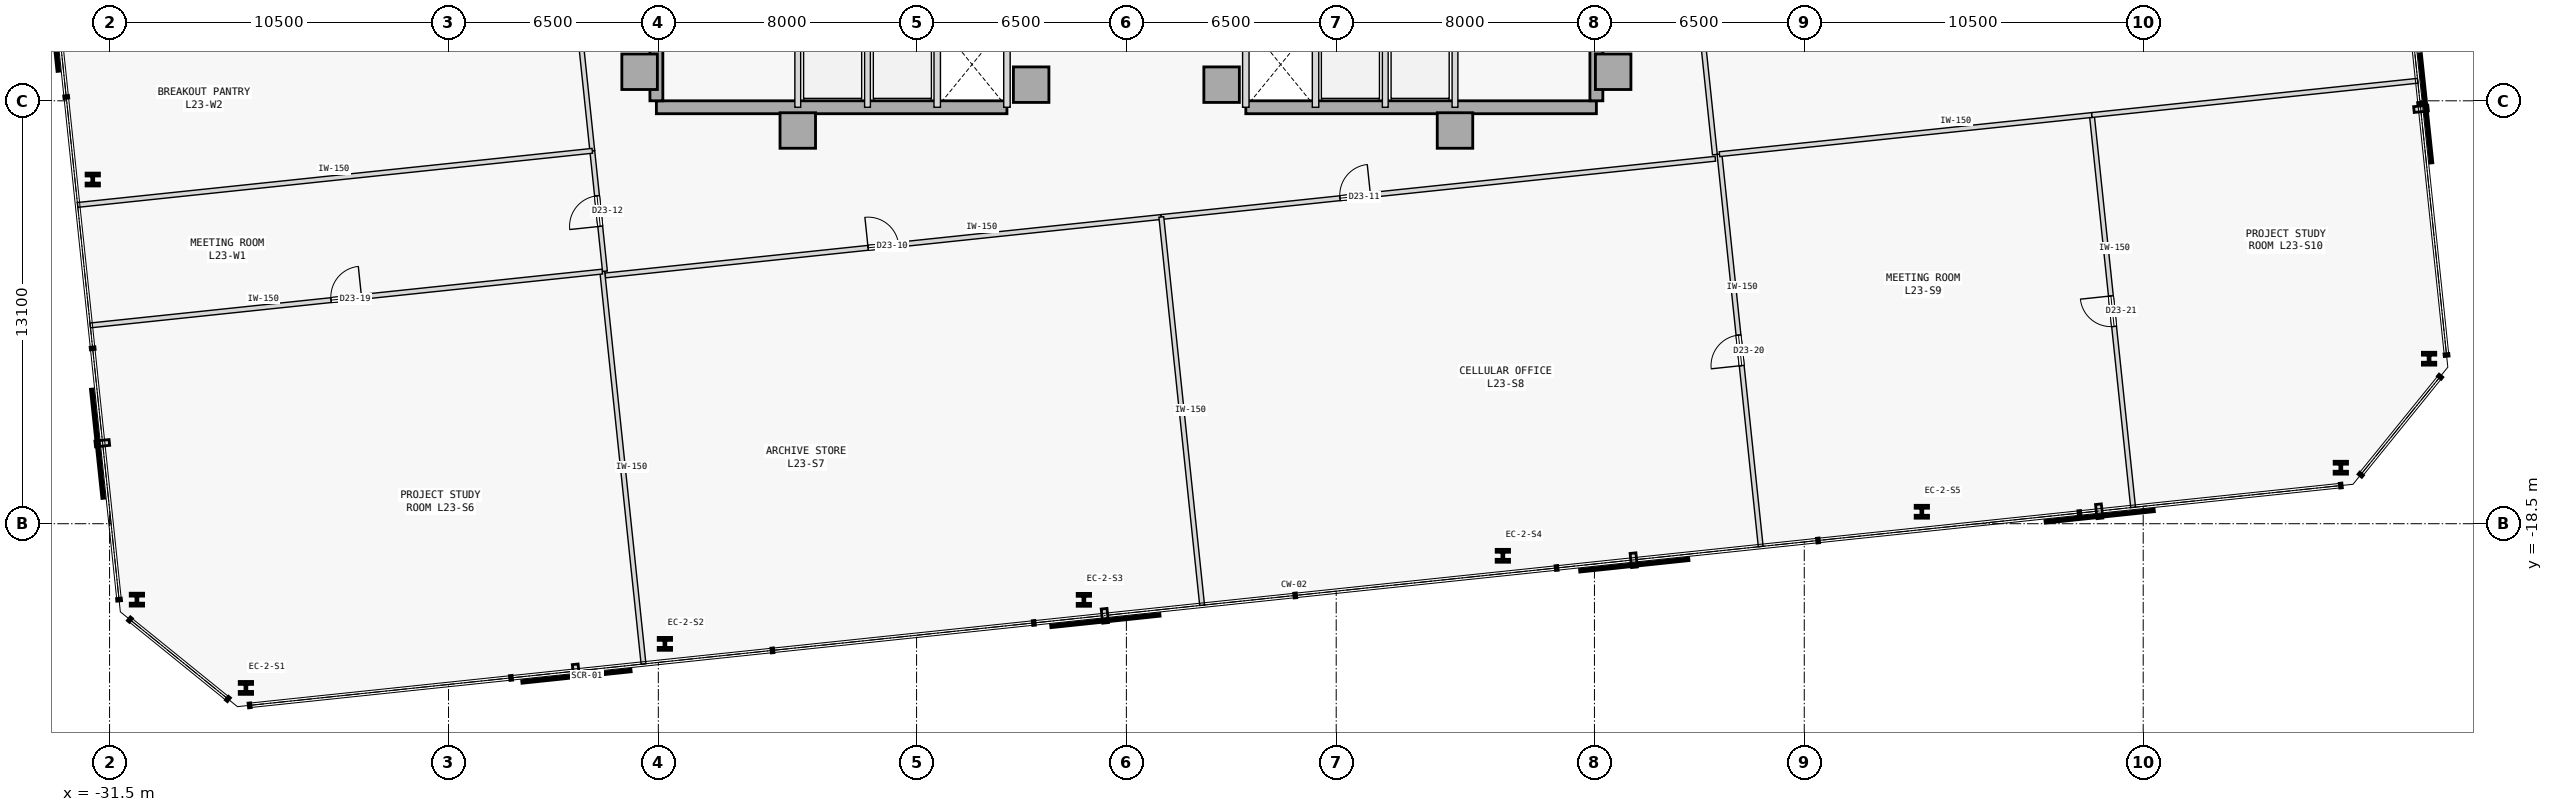
"""IFC4 building model, lengths in metres.
Left out: names, types, materials, properties, quantities, classifications, styles, units other than length and angle.
Written with IfcOpenShell. Run it as: python <this file> out.ifc"""

import sys

from ifc_helpers import new_model, si_unit, direction, frame, frame_2d, origin, origin_2d, place, context, subcontext, project, spatial, rectangle, i_section, extrude, element, fill, save


model = new_model("IFC4")
c1 = context("Model", 3, precision=1e-05, world=origin(), true_north=direction((0.0, 1.0)))
c2 = subcontext(c1, "Body", "Model", "MODEL_VIEW")
j1 = project(units=[si_unit("LENGTHUNIT", "METRE"), si_unit("PLANEANGLEUNIT", "RADIAN")], contexts=[c1])
p1 = place(None, origin())
s1 = spatial("IfcSite", under=j1, at=p1, CompositionType="ELEMENT")
p2 = place(p1, origin())
s2 = spatial("IfcBuilding", under=s1, at=p2, CompositionType="ELEMENT")
p3 = place(p2, frame((0.0, 0.0, 94.8)))
s3 = spatial("IfcBuildingStorey", under=s2, at=p3, CompositionType="ELEMENT", Elevation=94.8)
for number, where, z_axis, x_axis in (
    (1, (-15.08, -4.5, 0.0), (0.0, 0.0, 1.0), (1.0, 0.0, 0.0)),
    (2, (-10.18, -6.32, 0.0), (0.0, 0.0, 1.0), (1.0, 0.0, 0.0)),
    (3, (-2.95, -4.9, 0.0), (0.0, 0.0, 1.0), (1.0, 0.0, 0.0)),
    (4, (15.08, -4.5, 0.0), (0.0, 0.0, 1.0), (1.0, 0.0, 0.0)),
    (5, (10.18, -6.32, 0.0), (0.0, 0.0, 1.0), (1.0, 0.0, 0.0)),
    (6, (2.95, -4.9, 0.0), (0.0, 0.0, 1.0), (1.0, 0.0, 0.0)),
):
    element("IfcColumn", number, at=place(p3, frame(where, z_axis=z_axis, x_axis=x_axis)), inside=s3, PredefinedType="COLUMN", context=c2, shape_type="SweptSolid", body=[
        extrude(rectangle(XDim=1.1, YDim=1.1, at=origin_2d()), origin(), (0.0, 0.0, 1.0), 3.7),
    ])
p4 = place(p3, frame((-14.56, -5.6, 0.0), z_axis=(0.0, 0.0, 1.0), x_axis=(1.0, 0.0, 0.0)))
e7 = element("IfcWall", 7, at=p4, inside=s3, PredefinedType="SHEAR", context=c2, shape_type="SweptSolid", body=[
    extrude(rectangle(XDim=10.86, YDim=0.4, at=frame_2d((5.43, 0.0))), origin(), (0.0, 0.0, 1.0), 3.475),
])
p5 = place(p3, frame((-14.56, -5.4, 0.0), z_axis=(0.0, 0.0, 1.0), x_axis=(0.0, 1.0, 0.0)))
e8 = element("IfcWall", 8, at=p5, inside=s3, PredefinedType="SHEAR", context=c2, shape_type="SweptSolid", body=[
    extrude(rectangle(XDim=10.8, YDim=0.4, at=frame_2d((5.4, 0.0))), origin(), (0.0, 0.0, 1.0), 3.475),
])
p6 = place(p3, frame((3.7, -5.6, 0.0), z_axis=(0.0, 0.0, 1.0), x_axis=(1.0, 0.0, 0.0)))
e9 = element("IfcWall", 9, at=p6, inside=s3, PredefinedType="SHEAR", context=c2, shape_type="SweptSolid", body=[
    extrude(rectangle(XDim=10.86, YDim=0.4, at=frame_2d((5.43, 0.0))), origin(), (0.0, 0.0, 1.0), 3.475),
])
p7 = place(p3, frame((14.56, -5.4, 0.0), z_axis=(0.0, 0.0, 1.0), x_axis=(0.0, 1.0, 0.0)))
e10 = element("IfcWall", 10, at=p7, inside=s3, PredefinedType="SHEAR", context=c2, shape_type="SweptSolid", body=[
    extrude(rectangle(XDim=10.8, YDim=0.4, at=frame_2d((5.4, 0.0))), origin(), (0.0, 0.0, 1.0), 3.475),
])
for number, where, z_axis, x_axis in (
    (11, (-27.276, -23.586, 0.0), (0.0, 0.0, 1.0), (1.0, 0.0, 0.0)),
    (12, (-14.297, -22.222, 0.0), (0.0, 0.0, 1.0), (1.0, 0.0, 0.0)),
    (13, (-1.317, -20.858, 0.0), (0.0, 0.0, 1.0), (1.0, 0.0, 0.0)),
    (14, (11.663, -19.494, 0.0), (0.0, 0.0, 1.0), (1.0, 0.0, 0.0)),
    (15, (24.642, -18.129, 0.0), (0.0, 0.0, 1.0), (1.0, 0.0, 0.0)),
    (16, (37.622, -16.765, 0.0), (0.0, 0.0, 1.0), (1.0, 0.0, 0.0)),
    (17, (40.356, -13.389, 0.0), (0.0, 0.0, 1.0), (1.0, 0.0, 0.0)),
    (18, (-32.021, -7.838, 0.0), (0.0, 0.0, 1.0), (1.0, 0.0, 0.0)),
    (19, (-30.653, -20.852, 0.0), (0.0, 0.0, 1.0), (1.0, 0.0, 0.0)),
):
    element("IfcColumn", number, at=place(p3, frame(where, z_axis=z_axis, x_axis=x_axis)), inside=s3, PredefinedType="COLUMN", context=c2, shape_type="SweptSolid", body=[
        extrude(i_section(OverallWidth=0.413, OverallDepth=0.398, WebThickness=0.056, FlangeThickness=0.089, FilletRadius=0.015, at=origin_2d()), origin(), (0.0, 0.0, 1.0), 3.7),
    ])
for number, where, z_axis, x_axis in (
    (20, (-3.7, -5.6, 0.0), (0.0, 0.0, 1.0), (0.0, 1.0, 0.0)),
    (21, (-5.86, -5.6, 0.0), (0.0, 0.0, 1.0), (0.0, 1.0, 0.0)),
):
    element("IfcWall", number, at=place(p3, frame(where, z_axis=z_axis, x_axis=x_axis)), inside=s3, PredefinedType="STANDARD", context=c2, shape_type="SweptSolid", body=[
        extrude(rectangle(XDim=2.65, YDim=0.2, at=frame_2d((1.325, 0.0))), origin(), (0.0, 0.0, 1.0), 3.475),
    ])
for number, where, z_axis, x_axis in (
    (22, (-10.18, -5.6, 0.0), (0.0, 0.0, 1.0), (0.0, 1.0, 0.0)),
    (23, (-8.02, -5.6, 0.0), (0.0, 0.0, 1.0), (0.0, 1.0, 0.0)),
):
    element("IfcWall", number, at=place(p3, frame(where, z_axis=z_axis, x_axis=x_axis)), inside=s3, PredefinedType="STANDARD", context=c2, shape_type="SweptSolid", body=[
        extrude(rectangle(XDim=2.65, YDim=0.18, at=frame_2d((1.325, 0.0))), origin(), (0.0, 0.0, 1.0), 3.475),
    ])
for number, where, z_axis, x_axis in (
    (24, (3.7, -5.6, 0.0), (0.0, 0.0, 1.0), (0.0, 1.0, 0.0)),
    (25, (5.86, -5.6, 0.0), (0.0, 0.0, 1.0), (0.0, 1.0, 0.0)),
):
    element("IfcWall", number, at=place(p3, frame(where, z_axis=z_axis, x_axis=x_axis)), inside=s3, PredefinedType="STANDARD", context=c2, shape_type="SweptSolid", body=[
        extrude(rectangle(XDim=2.65, YDim=0.2, at=frame_2d((1.325, 0.0))), origin(), (0.0, 0.0, 1.0), 3.475),
    ])
for number, where, z_axis, x_axis in (
    (26, (10.18, -5.6, 0.0), (0.0, 0.0, 1.0), (0.0, 1.0, 0.0)),
    (27, (8.02, -5.6, 0.0), (0.0, 0.0, 1.0), (0.0, 1.0, 0.0)),
):
    element("IfcWall", number, at=place(p3, frame(where, z_axis=z_axis, x_axis=x_axis)), inside=s3, PredefinedType="STANDARD", context=c2, shape_type="SweptSolid", body=[
        extrude(rectangle(XDim=2.65, YDim=0.18, at=frame_2d((1.325, 0.0))), origin(), (0.0, 0.0, 1.0), 3.475),
    ])
p8 = place(p3, frame((-16.14, -10.809, 0.0), z_axis=(0.0, 0.0, 1.0), x_axis=(0.994522126729, 0.104526261998, 0.0)))
e28 = element("IfcWall", 28, at=p8, inside=s3, PredefinedType="PARTITIONING", context=c2, shape_type="SweptSolid", body=[
    extrude(rectangle(XDim=17.317, YDim=0.15, at=frame_2d((8.658, 0.0))), origin(), (0.0, 0.0, 1.0), 3.475),
])
p9 = place(p8, frame((8.184, 0.0, 0.0)))
e29 = element("IfcOpeningElement", 29, at=p9, cuts=e28, PredefinedType="OPENING", context=c2, shape_type="SweptSolid", body=[
    extrude(rectangle(XDim=0.95, YDim=2.15, at=frame_2d((0.475, 1.075))), frame((0.0, 0.085, 0.0), z_axis=(0.0, -1.0, 0.0), x_axis=(1.0, 0.0, 0.0)), (0.0, 0.0, 1.0), 0.17),
])
p10 = place(p3, frame((1.082, -8.999, 0.0), z_axis=(0.0, 0.0, 1.0), x_axis=(0.994522803526, 0.104519822363, 0.0)))
e30 = element("IfcWall", 30, at=p10, inside=s3, PredefinedType="PARTITIONING", context=c2, shape_type="SweptSolid", body=[
    extrude(rectangle(XDim=17.257, YDim=0.15, at=frame_2d((8.628, 0.0))), origin(), (0.0, 0.0, 1.0), 3.475),
])
p11 = place(p10, frame((5.565, 0.0, 0.0)))
e31 = element("IfcOpeningElement", 31, at=p11, cuts=e30, PredefinedType="OPENING", context=c2, shape_type="SweptSolid", body=[
    extrude(rectangle(XDim=0.95, YDim=2.15, at=frame_2d((0.475, 1.075))), frame((0.0, 0.085, 0.0), z_axis=(0.0, -1.0, 0.0), x_axis=(1.0, 0.0, 0.0)), (0.0, 0.0, 1.0), 0.17),
])
p12 = place(p3, frame((-16.153, -10.682, 0.0), z_axis=(0.0, 0.0, 1.0), x_axis=(-0.104539173002, 0.994520769671, 0.0)))
e32 = element("IfcWall", 32, at=p12, inside=s3, PredefinedType="PARTITIONING", context=c2, shape_type="SweptSolid", body=[
    extrude(rectangle(XDim=3.753, YDim=0.15, at=frame_2d((1.876, 0.0))), origin(), (0.0, 0.0, 1.0), 3.475),
])
p13 = place(p12, frame((1.402, 0.0, 0.0)))
e33 = element("IfcOpeningElement", 33, at=p13, cuts=e32, PredefinedType="OPENING", context=c2, shape_type="SweptSolid", body=[
    extrude(rectangle(XDim=0.95, YDim=2.15, at=frame_2d((0.475, 1.075))), frame((0.0, 0.085, 0.0), z_axis=(0.0, -1.0, 0.0), x_axis=(1.0, 0.0, 0.0)), (0.0, 0.0, 1.0), 0.17),
])
p14 = place(p3, frame((-16.546, -6.949, 0.0), z_axis=(0.0, 0.0, 1.0), x_axis=(-0.104520314957, 0.994522751756, 0.0)))
e34 = element("IfcWall", 34, at=p14, inside=s3, PredefinedType="PARTITIONING", context=c2, shape_type="SweptSolid", body=[
    extrude(rectangle(XDim=5.718, YDim=0.15, at=frame_2d((2.859, 0.0))), origin(), (0.0, 0.0, 1.0), 3.475),
])
p15 = place(p14, frame((3.242, 0.0, 0.0)))
e35 = element("IfcOpeningElement", 35, at=p15, cuts=e34, PredefinedType="OPENING", context=c2, shape_type="SweptSolid", body=[
    extrude(rectangle(XDim=0.95, YDim=2.15, at=frame_2d((0.475, 1.075))), frame((0.0, 0.085, 0.0), z_axis=(0.0, -1.0, 0.0), x_axis=(1.0, 0.0, 0.0)), (0.0, 0.0, 1.0), 0.17),
])
p16 = place(p3, frame((18.231, -7.068, 0.0), z_axis=(0.0, 0.0, 1.0), x_axis=(-0.104536082083, 0.994521094569, 0.0)))
e36 = element("IfcWall", 36, at=p16, inside=s3, PredefinedType="PARTITIONING", context=c2, shape_type="SweptSolid", body=[
    extrude(rectangle(XDim=11.794, YDim=0.15, at=frame_2d((5.897, 0.0))), origin(), (0.0, 0.0, 1.0), 3.475),
])
p17 = place(p16, frame((5.422, 0.0, 0.0)))
e37 = element("IfcOpeningElement", 37, at=p17, cuts=e36, PredefinedType="OPENING", context=c2, shape_type="SweptSolid", body=[
    extrude(rectangle(XDim=0.95, YDim=2.15, at=frame_2d((0.475, 1.075))), frame((0.0, 0.085, 0.0), z_axis=(0.0, -1.0, 0.0), x_axis=(1.0, 0.0, 0.0)), (0.0, 0.0, 1.0), 0.17),
])
p18 = place(p3, frame((-14.958, -22.844, 0.0), z_axis=(0.0, 0.0, 1.0), x_axis=(-0.104540236679, 0.994520657862, 0.0)))
e38 = element("IfcWall", 38, at=p18, inside=s3, PredefinedType="PARTITIONING", context=c2, shape_type="SweptSolid", body=[
    extrude(rectangle(XDim=12.221, YDim=0.15, at=frame_2d((6.11, 0.0))), origin(), (0.0, 0.0, 1.0), 3.475),
])
p19 = place(p3, frame((-32.099, -12.358, 0.0), z_axis=(0.0, 0.0, 1.0), x_axis=(0.994521795881, 0.104529409818, 0.0)))
e39 = element("IfcWall", 39, at=p19, inside=s3, PredefinedType="PARTITIONING", context=c2, shape_type="SweptSolid", body=[
    extrude(rectangle(XDim=15.95, YDim=0.15, at=frame_2d((7.975, 0.0))), origin(), (0.0, 0.0, 1.0), 3.475),
])
p20 = place(p19, frame((7.5, 0.0, 0.0)))
e40 = element("IfcOpeningElement", 40, at=p20, cuts=e39, PredefinedType="OPENING", context=c2, shape_type="SweptSolid", body=[
    extrude(rectangle(XDim=0.95, YDim=2.15, at=frame_2d((0.475, 1.075))), frame((0.0, 0.085, 0.0), z_axis=(0.0, -1.0, 0.0), x_axis=(1.0, 0.0, 0.0)), (0.0, 0.0, 1.0), 0.17),
])
p21 = place(p3, frame((2.346, -21.026, 0.0), z_axis=(0.0, 0.0, 1.0), x_axis=(-0.104535555083, 0.994521149963, 0.0)))
e41 = element("IfcWall", 41, at=p21, inside=s3, PredefinedType="PARTITIONING", context=c2, shape_type="SweptSolid", body=[
    extrude(rectangle(XDim=12.093, YDim=0.15, at=frame_2d((6.046, 0.0))), origin(), (0.0, 0.0, 1.0), 3.475),
])
p22 = place(p3, frame((19.651, -19.207, 0.0), z_axis=(0.0, 0.0, 1.0), x_axis=(-0.104540236679, 0.994520657862, 0.0)))
e42 = element("IfcWall", 42, at=p22, inside=s3, PredefinedType="PARTITIONING", context=c2, shape_type="SweptSolid", body=[
    extrude(rectangle(XDim=12.221, YDim=0.15, at=frame_2d((6.11, 0.0))), origin(), (0.0, 0.0, 1.0), 3.475),
])
p23 = place(p22, frame((5.635, 0.0, 0.0)))
e43 = element("IfcOpeningElement", 43, at=p23, cuts=e42, PredefinedType="OPENING", context=c2, shape_type="SweptSolid", body=[
    extrude(rectangle(XDim=0.95, YDim=2.15, at=frame_2d((0.475, 1.075))), frame((0.0, 0.085, 0.0), z_axis=(0.0, -1.0, 0.0), x_axis=(1.0, 0.0, 0.0)), (0.0, 0.0, 1.0), 0.17),
])
p24 = place(p3, frame((31.187, -17.994, 0.0), z_axis=(0.0, 0.0, 1.0), x_axis=(-0.104520477826, 0.99452273464, 0.0)))
e44 = element("IfcWall", 44, at=p24, inside=s3, PredefinedType="PARTITIONING", context=c2, shape_type="SweptSolid", body=[
    extrude(rectangle(XDim=12.221, YDim=0.15, at=frame_2d((6.11, 0.0))), origin(), (0.0, 0.0, 1.0), 3.475),
])
p25 = place(p24, frame((5.635, 0.0, 0.0)))
e45 = element("IfcOpeningElement", 45, at=p25, cuts=e44, PredefinedType="OPENING", context=c2, shape_type="SweptSolid", body=[
    extrude(rectangle(XDim=0.95, YDim=2.15, at=frame_2d((0.475, 1.075))), frame((0.0, 0.085, 0.0), z_axis=(0.0, -1.0, 0.0), x_axis=(1.0, 0.0, 0.0)), (0.0, 0.0, 1.0), 0.17),
])
p26 = place(p3, frame((18.373, -7.053, 0.0), z_axis=(0.0, 0.0, 1.0), x_axis=(0.994521010406, 0.104536882776, 0.0)))
e46 = element("IfcWall", 46, at=p26, inside=s3, PredefinedType="PARTITIONING", context=c2, shape_type="SweptSolid", body=[
    extrude(rectangle(XDim=11.6, YDim=0.15, at=frame_2d((5.8, 0.0))), origin(), (0.0, 0.0, 1.0), 3.475),
])
p27 = place(p3, frame((29.91, -5.84, 0.0), z_axis=(0.0, 0.0, 1.0), x_axis=(0.994521257273, 0.104534534165, 0.0)))
e47 = element("IfcWall", 47, at=p27, inside=s3, PredefinedType="PARTITIONING", context=c2, shape_type="SweptSolid", body=[
    extrude(rectangle(XDim=10.15, YDim=0.15, at=frame_2d((5.075, 0.0))), origin(), (0.0, 0.0, 1.0), 3.475),
])
p28 = place(p3, frame((-32.491, -8.625, 0.0), z_axis=(0.0, 0.0, 1.0), x_axis=(0.994522794159, 0.104519911488, 0.0)))
e48 = element("IfcWall", 48, at=p28, inside=s3, PredefinedType="PARTITIONING", context=c2, shape_type="SweptSolid", body=[
    extrude(rectangle(XDim=16.033, YDim=0.15, at=frame_2d((8.017, 0.0))), origin(), (0.0, 0.0, 1.0), 3.475),
])
p29 = place(p9, origin())
e49 = element("IfcDoor", 49, at=p29, inside=s3, OperationType="SINGLE_SWING_LEFT", PredefinedType="DOOR", context=c2, shape_type="SweptSolid", body=[
    extrude(rectangle(XDim=0.95, YDim=2.15, at=frame_2d((0.475, 1.075))), frame((0.0, 0.025, 0.0), z_axis=(0.0, -1.0, 0.0), x_axis=(1.0, 0.0, 0.0)), (0.0, 0.0, 1.0), 0.05),
])
fill(e29, e49)
p30 = place(p11, origin())
e50 = element("IfcDoor", 50, at=p30, inside=s3, OperationType="SINGLE_SWING_RIGHT", PredefinedType="DOOR", context=c2, shape_type="SweptSolid", body=[
    extrude(rectangle(XDim=0.95, YDim=2.15, at=frame_2d((0.475, 1.075))), frame((0.0, 0.025, 0.0), z_axis=(0.0, -1.0, 0.0), x_axis=(1.0, 0.0, 0.0)), (0.0, 0.0, 1.0), 0.05),
])
fill(e31, e50)
p31 = place(p13, origin())
e51 = element("IfcDoor", 51, at=p31, inside=s3, OperationType="SINGLE_SWING_LEFT", PredefinedType="DOOR", context=c2, shape_type="SweptSolid", body=[
    extrude(rectangle(XDim=0.95, YDim=2.15, at=frame_2d((0.475, 1.075))), frame((0.0, 0.025, 0.0), z_axis=(0.0, -1.0, 0.0), x_axis=(1.0, 0.0, 0.0)), (0.0, 0.0, 1.0), 0.05),
])
fill(e33, e51)
p32 = place(p20, origin())
e52 = element("IfcDoor", 52, at=p32, inside=s3, OperationType="SINGLE_SWING_RIGHT", PredefinedType="DOOR", context=c2, shape_type="SweptSolid", body=[
    extrude(rectangle(XDim=0.95, YDim=2.15, at=frame_2d((0.475, 1.075))), frame((0.0, 0.025, 0.0), z_axis=(0.0, -1.0, 0.0), x_axis=(1.0, 0.0, 0.0)), (0.0, 0.0, 1.0), 0.05),
])
fill(e40, e52)
p33 = place(p23, origin())
e53 = element("IfcDoor", 53, at=p33, inside=s3, OperationType="SINGLE_SWING_LEFT", PredefinedType="DOOR", context=c2, shape_type="SweptSolid", body=[
    extrude(rectangle(XDim=0.95, YDim=2.15, at=frame_2d((0.475, 1.075))), frame((0.0, 0.025, 0.0), z_axis=(0.0, -1.0, 0.0), x_axis=(1.0, 0.0, 0.0)), (0.0, 0.0, 1.0), 0.05),
])
fill(e43, e53)
p34 = place(p25, origin())
e54 = element("IfcDoor", 54, at=p34, inside=s3, OperationType="SINGLE_SWING_RIGHT", PredefinedType="DOOR", context=c2, shape_type="SweptSolid", body=[
    extrude(rectangle(XDim=0.95, YDim=2.15, at=frame_2d((0.475, 1.075))), frame((0.0, 0.025, 0.0), z_axis=(0.0, -1.0, 0.0), x_axis=(1.0, 0.0, 0.0)), (0.0, 0.0, 1.0), 0.05),
])
fill(e45, e54)
save(model, sys.argv[1])
